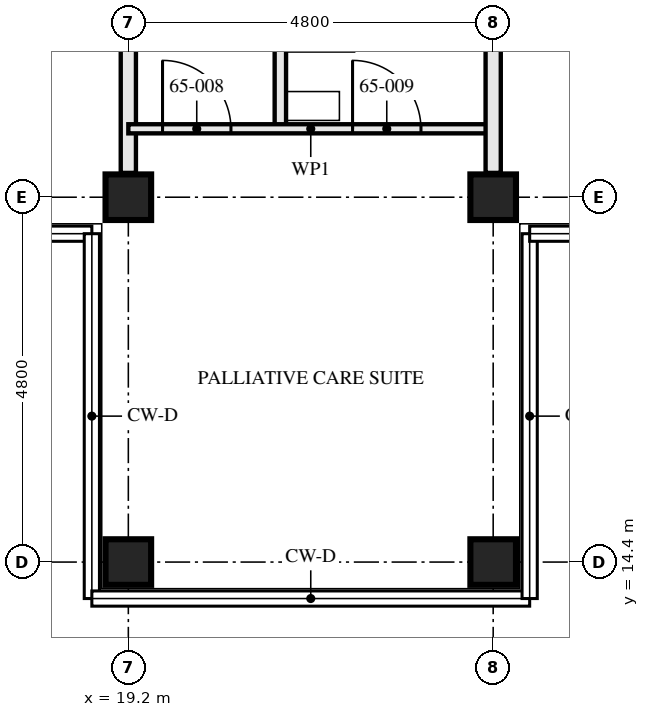
"""IFC4 building model, lengths in metres.
Left out: names, types, materials, properties, quantities, classifications, styles, units other than length and angle.
Written with IfcOpenShell. Run it as: python <this file> out.ifc"""

import sys

from ifc_helpers import new_model, si_unit, direction, frame, frame_2d, origin, origin_2d, place, context, subcontext, project, spatial, rectangle, hollow_rectangle, extrude, element, fill, save


model = new_model("IFC4")
c1 = context("Model", 3, precision=1e-05, world=origin(), true_north=direction((0.0, 1.0)))
c2 = subcontext(c1, "Body", "Model", "MODEL_VIEW")
j1 = project(units=[si_unit("LENGTHUNIT", "METRE"), si_unit("PLANEANGLEUNIT", "RADIAN")], contexts=[c1])
p1 = place(None, origin())
s1 = spatial("IfcSite", under=j1, at=p1, CompositionType="ELEMENT")
p2 = place(p1, origin())
s2 = spatial("IfcBuilding", under=s1, at=p2, CompositionType="ELEMENT")
p3 = place(p2, frame((0.0, 0.0, 236.5)))
s3 = spatial("IfcBuildingStorey", under=s2, at=p3, CompositionType="ELEMENT", Elevation=236.5)
for number, where, z_axis, x_axis in (
    (1, (19.2, 14.4, 0.0), (0.0, 0.0, 1.0), (0.0, 1.0, 0.0)),
    (2, (19.2, 19.2, 0.0), (0.0, 0.0, 1.0), (0.0, 1.0, 0.0)),
    (3, (24.0, 14.4, 0.0), (0.0, 0.0, 1.0), (0.0, 1.0, 0.0)),
    (4, (24.0, 19.2, 0.0), (0.0, 0.0, 1.0), (0.0, 1.0, 0.0)),
):
    element("IfcColumn", number, at=place(p3, frame(where, z_axis=z_axis, x_axis=x_axis)), inside=s3, PredefinedType="COLUMN", context=c2, shape_type="SweptSolid", body=[
        extrude(hollow_rectangle(XDim=0.6, YDim=0.6, WallThickness=0.05, at=origin_2d()), origin(), (0.0, 0.0, 1.0), 3.5),
    ])
p4 = place(p3, frame((19.2, 19.52, 0.0), z_axis=(0.0, 0.0, 1.0), x_axis=(0.0, 1.0, 0.0)))
e5 = element("IfcWall", 5, at=p4, inside=s3, PredefinedType="PARTITIONING", context=c2, shape_type="SweptSolid", body=[
    extrude(rectangle(XDim=6.68, YDim=0.2, at=frame_2d((3.34, 0.0))), origin(), (0.0, 0.0, 1.0), 2.55),
])
p5 = place(p3, frame((21.2, 20.1, 0.0), z_axis=(0.0, 0.0, 1.0), x_axis=(0.0, 1.0, 0.0)))
e6 = element("IfcWall", 6, at=p5, inside=s3, PredefinedType="PARTITIONING", context=c2, shape_type="SweptSolid", body=[
    extrude(rectangle(XDim=3.0, YDim=0.15, at=frame_2d((1.5, 0.0))), origin(), (0.0, 0.0, 1.0), 3.33),
])
p6 = place(p3, frame((19.2, 20.1, 0.0), z_axis=(0.0, 0.0, 1.0), x_axis=(1.0, 0.0, 0.0)))
e7 = element("IfcWall", 7, at=p6, inside=s3, PredefinedType="PARTITIONING", context=c2, shape_type="SweptSolid", body=[
    extrude(rectangle(XDim=4.8, YDim=0.12, at=frame_2d((2.4, 0.0))), origin(), (0.0, 0.0, 1.0), 3.33),
])
p7 = place(p6, frame((0.45, 0.0, 0.0)))
e8 = element("IfcOpeningElement", 8, at=p7, cuts=e7, PredefinedType="OPENING", context=c2, shape_type="SweptSolid", body=[
    extrude(rectangle(XDim=0.9, YDim=2.1, at=frame_2d((0.45, 1.05))), frame((0.0, 0.071, 0.0), z_axis=(0.0, -1.0, 0.0), x_axis=(1.0, 0.0, 0.0)), (0.0, 0.0, 1.0), 0.141),
])
p8 = place(p6, frame((2.95, 0.0, 0.0)))
e9 = element("IfcOpeningElement", 9, at=p8, cuts=e7, PredefinedType="OPENING", context=c2, shape_type="SweptSolid", body=[
    extrude(rectangle(XDim=0.9, YDim=2.1, at=frame_2d((0.45, 1.05))), frame((0.0, 0.071, 0.0), z_axis=(0.0, -1.0, 0.0), x_axis=(1.0, 0.0, 0.0)), (0.0, 0.0, 1.0), 0.141),
])
p9 = place(p3, frame((24.0, 19.52, 0.0), z_axis=(0.0, 0.0, 1.0), x_axis=(0.0, 1.0, 0.0)))
e10 = element("IfcWall", 10, at=p9, inside=s3, PredefinedType="PARTITIONING", context=c2, shape_type="SweptSolid", body=[
    extrude(rectangle(XDim=6.68, YDim=0.2, at=frame_2d((3.34, 0.0))), origin(), (0.0, 0.0, 1.0), 2.55),
])
p10 = place(p7, origin())
e11 = element("IfcDoor", 11, at=p10, inside=s3, OperationType="SINGLE_SWING_RIGHT", PredefinedType="DOOR", context=c2, shape_type="SweptSolid", body=[
    extrude(rectangle(XDim=0.9, YDim=2.1, at=frame_2d((0.45, 1.05))), frame((0.0, 0.022, 0.0), z_axis=(0.0, -1.0, 0.0), x_axis=(1.0, 0.0, 0.0)), (0.0, 0.0, 1.0), 0.044),
])
fill(e8, e11)
p11 = place(p8, origin())
e12 = element("IfcDoor", 12, at=p11, inside=s3, OperationType="SINGLE_SWING_RIGHT", PredefinedType="DOOR", context=c2, shape_type="SweptSolid", body=[
    extrude(rectangle(XDim=0.9, YDim=2.1, at=frame_2d((0.45, 1.05))), frame((0.0, 0.022, 0.0), z_axis=(0.0, -1.0, 0.0), x_axis=(1.0, 0.0, 0.0)), (0.0, 0.0, 1.0), 0.044),
])
fill(e9, e12)
save(model, sys.argv[1])
